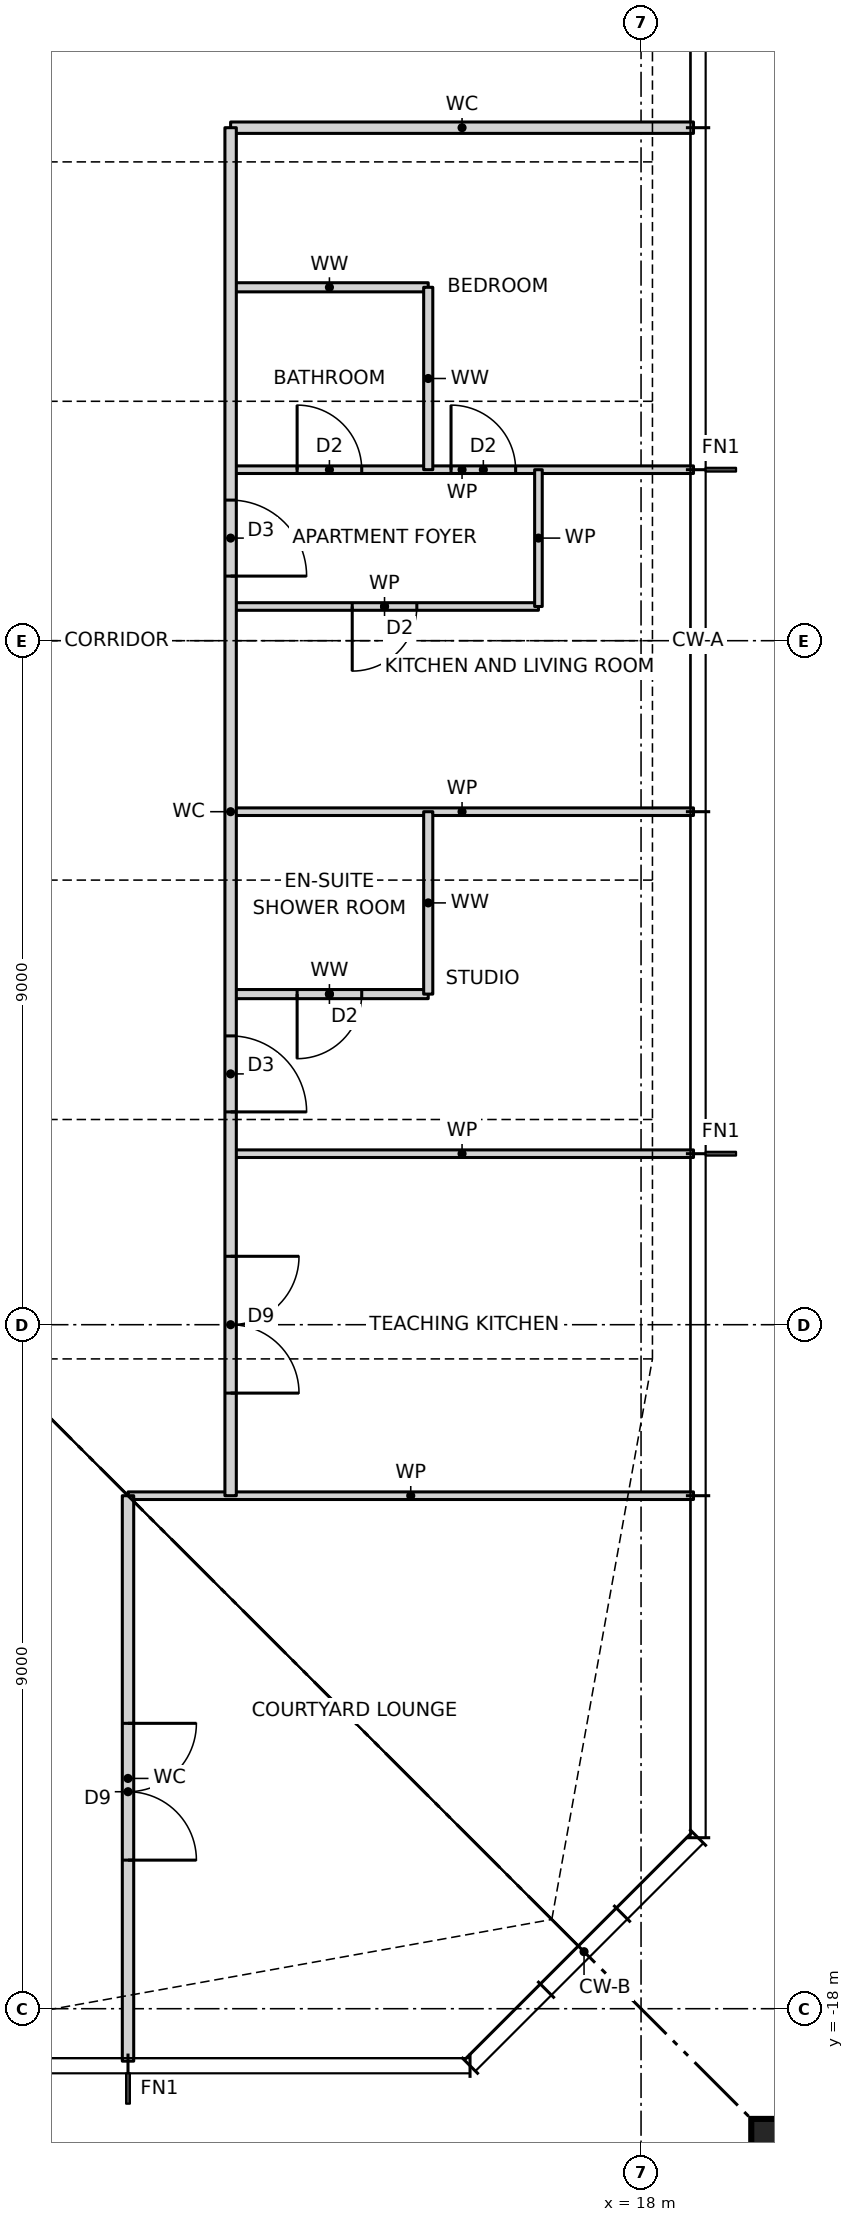
"""IFC4 building model, lengths in metres.
Left out: names, types, materials, properties, quantities, classifications, styles, units other than length and angle.
Written with IfcOpenShell. Run it as: python <this file> out.ifc"""

import sys

from ifc_helpers import new_model, si_unit, direction, frame, frame_2d, origin, origin_2d, place, context, subcontext, project, spatial, rectangle, i_section, extrude, element, fill, save


model = new_model("IFC4")
c1 = context("Model", 3, precision=1e-05, world=origin(), true_north=direction((0.0, 1.0)))
c2 = subcontext(c1, "Body", "Model", "MODEL_VIEW")
j1 = project(units=[si_unit("LENGTHUNIT", "METRE"), si_unit("PLANEANGLEUNIT", "RADIAN")], contexts=[c1])
p1 = place(None, origin())
s1 = spatial("IfcSite", under=j1, at=p1, CompositionType="ELEMENT")
p2 = place(p1, origin())
s2 = spatial("IfcBuilding", under=s1, at=p2, CompositionType="ELEMENT")
p3 = place(p2, frame((0.0, 0.0, 205.5)))
s3 = spatial("IfcBuildingStorey", under=s2, at=p3, CompositionType="ELEMENT", Elevation=205.5)
p4 = place(p3, frame((21.65, -21.65, 0.0), z_axis=(0.0, 0.0, 1.0), x_axis=(1.0, 0.0, 0.0)))
e1 = element("IfcColumn", 1, at=p4, inside=s3, PredefinedType="COLUMN", context=c2, shape_type="SweptSolid", body=[
    extrude(rectangle(XDim=4.4, YDim=4.4, at=origin_2d()), origin(), (0.0, 0.0, 1.0), 3.5),
    extrude(i_section(OverallWidth=0.478, OverallDepth=0.599, WebThickness=0.1, FlangeThickness=0.14, at=origin_2d()), origin(), (0.0, 0.0, 1.0), 3.5),
])
p5 = place(p3, frame((11.25, -11.25, 0.0), z_axis=(0.0, 0.0, 1.0), x_axis=(1.0, 0.0, 0.0)))
e2 = element("IfcWall", 2, at=p5, inside=s3, PredefinedType="PARTITIONING", context=c2, shape_type="SweptSolid", body=[
    extrude(rectangle(XDim=7.44, YDim=0.1, at=frame_2d((3.72, 0.0))), origin(), (0.0, 0.0, 1.0), 3.2),
])
p6 = place(p3, frame((12.6, -6.75, 0.0), z_axis=(0.0, 0.0, 1.0), x_axis=(1.0, 0.0, 0.0)))
e3 = element("IfcWall", 3, at=p6, inside=s3, PredefinedType="PARTITIONING", context=c2, shape_type="SweptSolid", body=[
    extrude(rectangle(XDim=6.09, YDim=0.1, at=frame_2d((3.045, 0.0))), origin(), (0.0, 0.0, 1.0), 3.2),
])
p7 = place(p3, frame((12.6, -4.65, 0.0), z_axis=(0.0, 0.0, 1.0), x_axis=(1.0, 0.0, 0.0)))
e4 = element("IfcWall", 4, at=p7, inside=s3, PredefinedType="PARTITIONING", context=c2, shape_type="SweptSolid", body=[
    extrude(rectangle(XDim=2.6, YDim=0.12, at=frame_2d((1.3, 0.0))), origin(), (0.0, 0.0, 1.0), 3.2),
])
p8 = place(p7, frame((0.875, 0.0, 0.0)))
e5 = element("IfcOpeningElement", 5, at=p8, cuts=e4, PredefinedType="OPENING", context=c2, shape_type="SweptSolid", body=[
    extrude(rectangle(XDim=0.85, YDim=2.1, at=frame_2d((0.425, 1.05))), frame((0.0, 0.07, 0.0), z_axis=(0.0, -1.0, 0.0), x_axis=(1.0, 0.0, 0.0)), (0.0, 0.0, 1.0), 0.14),
])
p9 = place(p3, frame((12.6, -2.25, 0.0), z_axis=(0.0, 0.0, 1.0), x_axis=(1.0, 0.0, 0.0)))
e6 = element("IfcWall", 6, at=p9, inside=s3, PredefinedType="PARTITIONING", context=c2, shape_type="SweptSolid", body=[
    extrude(rectangle(XDim=6.09, YDim=0.1, at=frame_2d((3.045, 0.0))), origin(), (0.0, 0.0, 1.0), 3.2),
])
p10 = place(p3, frame((12.6, 0.45, 0.0), z_axis=(0.0, 0.0, 1.0), x_axis=(1.0, 0.0, 0.0)))
e7 = element("IfcWall", 7, at=p10, inside=s3, PredefinedType="PARTITIONING", context=c2, shape_type="SweptSolid", body=[
    extrude(rectangle(XDim=4.05, YDim=0.1, at=frame_2d((2.025, 0.0))), origin(), (0.0, 0.0, 1.0), 3.2),
])
p11 = place(p10, frame((1.6, 0.0, 0.0)))
e8 = element("IfcOpeningElement", 8, at=p11, cuts=e7, PredefinedType="OPENING", context=c2, shape_type="SweptSolid", body=[
    extrude(rectangle(XDim=0.85, YDim=2.1, at=frame_2d((0.425, 1.05))), frame((0.0, 0.06, 0.0), z_axis=(0.0, -1.0, 0.0), x_axis=(1.0, 0.0, 0.0)), (0.0, 0.0, 1.0), 0.12),
])
p12 = place(p3, frame((12.6, 2.25, 0.0), z_axis=(0.0, 0.0, 1.0), x_axis=(1.0, 0.0, 0.0)))
e9 = element("IfcWall", 9, at=p12, inside=s3, PredefinedType="PARTITIONING", context=c2, shape_type="SweptSolid", body=[
    extrude(rectangle(XDim=6.09, YDim=0.1, at=frame_2d((3.045, 0.0))), origin(), (0.0, 0.0, 1.0), 3.2),
])
p13 = place(p12, frame((2.9, 0.0, 0.0)))
e10 = element("IfcOpeningElement", 10, at=p13, cuts=e9, PredefinedType="OPENING", context=c2, shape_type="SweptSolid", body=[
    extrude(rectangle(XDim=0.85, YDim=2.1, at=frame_2d((0.425, 1.05))), frame((0.0, 0.06, 0.0), z_axis=(0.0, -1.0, 0.0), x_axis=(1.0, 0.0, 0.0)), (0.0, 0.0, 1.0), 0.12),
])
p14 = place(p12, frame((0.875, 0.0, 0.0)))
e11 = element("IfcOpeningElement", 11, at=p14, cuts=e9, PredefinedType="OPENING", context=c2, shape_type="SweptSolid", body=[
    extrude(rectangle(XDim=0.85, YDim=2.1, at=frame_2d((0.425, 1.05))), frame((0.0, 0.06, 0.0), z_axis=(0.0, -1.0, 0.0), x_axis=(1.0, 0.0, 0.0)), (0.0, 0.0, 1.0), 0.12),
])
p15 = place(p3, frame((12.6, 4.65, 0.0), z_axis=(0.0, 0.0, 1.0), x_axis=(1.0, 0.0, 0.0)))
e12 = element("IfcWall", 12, at=p15, inside=s3, PredefinedType="PARTITIONING", context=c2, shape_type="SweptSolid", body=[
    extrude(rectangle(XDim=2.6, YDim=0.12, at=frame_2d((1.3, 0.0))), origin(), (0.0, 0.0, 1.0), 3.2),
])
p16 = place(p3, frame((12.6, 6.75, 0.0), z_axis=(0.0, 0.0, 1.0), x_axis=(1.0, 0.0, 0.0)))
e13 = element("IfcWall", 13, at=p16, inside=s3, PredefinedType="PARTITIONING", context=c2, shape_type="SweptSolid", body=[
    extrude(rectangle(XDim=6.09, YDim=0.15, at=frame_2d((3.045, 0.0))), origin(), (0.0, 0.0, 1.0), 3.2),
])
p17 = place(p3, frame((16.65, 0.45, 0.0), z_axis=(0.0, 0.0, 1.0), x_axis=(0.0, 1.0, 0.0)))
e14 = element("IfcWall", 14, at=p17, inside=s3, PredefinedType="PARTITIONING", context=c2, shape_type="SweptSolid", body=[
    extrude(rectangle(XDim=1.8, YDim=0.1, at=frame_2d((0.9, 0.0))), origin(), (0.0, 0.0, 1.0), 3.2),
])
for number, where, z_axis, x_axis in (
    (15, (15.2, -4.65, 0.0), (0.0, 0.0, 1.0), (0.0, 1.0, 0.0)),
    (16, (15.2, 2.25, 0.0), (0.0, 0.0, 1.0), (0.0, 1.0, 0.0)),
):
    element("IfcWall", number, at=place(p3, frame(where, z_axis=z_axis, x_axis=x_axis)), inside=s3, PredefinedType="PARTITIONING", context=c2, shape_type="SweptSolid", body=[
        extrude(rectangle(XDim=2.4, YDim=0.12, at=frame_2d((1.2, 0.0))), origin(), (0.0, 0.0, 1.0), 3.2),
    ])
p18 = place(p3, frame((12.6, -11.25, 0.0), z_axis=(0.0, 0.0, 1.0), x_axis=(0.0, 1.0, 0.0)))
e17 = element("IfcWall", 17, at=p18, inside=s3, PredefinedType="PARTITIONING", context=c2, shape_type="SweptSolid", body=[
    extrude(rectangle(XDim=18.0, YDim=0.15, at=frame_2d((9.0, 0.0))), origin(), (0.0, 0.0, 1.0), 3.2),
])
p19 = place(p18, frame((1.35, 0.0, 0.0)))
e18 = element("IfcOpeningElement", 18, at=p19, cuts=e17, PredefinedType="OPENING", context=c2, shape_type="SweptSolid", body=[
    extrude(rectangle(XDim=1.8, YDim=2.1, at=frame_2d((0.9, 1.05))), frame((0.0, 0.085, 0.0), z_axis=(0.0, -1.0, 0.0), x_axis=(1.0, 0.0, 0.0)), (0.0, 0.0, 1.0), 0.17),
])
p20 = place(p18, frame((5.05, 0.0, 0.0)))
e19 = element("IfcOpeningElement", 19, at=p20, cuts=e17, PredefinedType="OPENING", context=c2, shape_type="SweptSolid", body=[
    extrude(rectangle(XDim=1.0, YDim=2.1, at=frame_2d((0.5, 1.05))), frame((0.0, 0.085, 0.0), z_axis=(0.0, -1.0, 0.0), x_axis=(1.0, 0.0, 0.0)), (0.0, 0.0, 1.0), 0.17),
])
p21 = place(p18, frame((12.1, 0.0, 0.0)))
e20 = element("IfcOpeningElement", 20, at=p21, cuts=e17, PredefinedType="OPENING", context=c2, shape_type="SweptSolid", body=[
    extrude(rectangle(XDim=1.0, YDim=2.1, at=frame_2d((0.5, 1.05))), frame((0.0, 0.085, 0.0), z_axis=(0.0, -1.0, 0.0), x_axis=(1.0, 0.0, 0.0)), (0.0, 0.0, 1.0), 0.17),
])
p22 = place(p3, frame((11.25, -18.69, 0.0), z_axis=(0.0, 0.0, 1.0), x_axis=(0.0, 1.0, 0.0)))
e21 = element("IfcWall", 21, at=p22, inside=s3, PredefinedType="PARTITIONING", context=c2, shape_type="SweptSolid", body=[
    extrude(rectangle(XDim=7.44, YDim=0.15, at=frame_2d((3.72, 0.0))), origin(), (0.0, 0.0, 1.0), 3.2),
])
p23 = place(p22, frame((2.645, 0.0, 0.0)))
e22 = element("IfcOpeningElement", 22, at=p23, cuts=e21, PredefinedType="OPENING", context=c2, shape_type="SweptSolid", body=[
    extrude(rectangle(XDim=1.8, YDim=2.1, at=frame_2d((0.9, 1.05))), frame((0.0, 0.085, 0.0), z_axis=(0.0, -1.0, 0.0), x_axis=(1.0, 0.0, 0.0)), (0.0, 0.0, 1.0), 0.17),
])
p24 = place(p19, frame((1.8, 0.0, 0.0), z_axis=(0.0, 0.0, 1.0), x_axis=(-1.0, 0.0, 0.0)))
e23 = element("IfcDoor", 23, at=p24, inside=s3, OperationType="DOUBLE_DOOR_SINGLE_SWING", PredefinedType="DOOR", context=c2, shape_type="SweptSolid", body=[
    extrude(rectangle(XDim=1.8, YDim=2.1, at=frame_2d((0.9, 1.05))), frame((0.0, 0.025, 0.0), z_axis=(0.0, -1.0, 0.0), x_axis=(1.0, 0.0, 0.0)), (0.0, 0.0, 1.0), 0.05),
])
fill(e18, e23)
p25 = place(p20, frame((1.0, 0.0, 0.0), z_axis=(0.0, 0.0, 1.0), x_axis=(-1.0, 0.0, 0.0)))
e24 = element("IfcDoor", 24, at=p25, inside=s3, OperationType="SINGLE_SWING_RIGHT", PredefinedType="DOOR", context=c2, shape_type="SweptSolid", body=[
    extrude(rectangle(XDim=1.0, YDim=2.1, at=frame_2d((0.5, 1.05))), frame((0.0, 0.025, 0.0), z_axis=(0.0, -1.0, 0.0), x_axis=(1.0, 0.0, 0.0)), (0.0, 0.0, 1.0), 0.05),
])
fill(e19, e24)
p26 = place(p8, frame((0.85, 0.0, 0.0), z_axis=(0.0, 0.0, 1.0), x_axis=(-1.0, 0.0, 0.0)))
e25 = element("IfcDoor", 25, at=p26, inside=s3, OperationType="SINGLE_SWING_RIGHT", PredefinedType="DOOR", context=c2, shape_type="SweptSolid", body=[
    extrude(rectangle(XDim=0.85, YDim=2.1, at=frame_2d((0.425, 1.05))), frame((0.0, 0.025, 0.0), z_axis=(0.0, -1.0, 0.0), x_axis=(1.0, 0.0, 0.0)), (0.0, 0.0, 1.0), 0.05),
])
fill(e5, e25)
p27 = place(p21, frame((1.0, 0.0, 0.0), z_axis=(0.0, 0.0, 1.0), x_axis=(-1.0, 0.0, 0.0)))
e26 = element("IfcDoor", 26, at=p27, inside=s3, OperationType="SINGLE_SWING_RIGHT", PredefinedType="DOOR", context=c2, shape_type="SweptSolid", body=[
    extrude(rectangle(XDim=1.0, YDim=2.1, at=frame_2d((0.5, 1.05))), frame((0.0, 0.025, 0.0), z_axis=(0.0, -1.0, 0.0), x_axis=(1.0, 0.0, 0.0)), (0.0, 0.0, 1.0), 0.05),
])
fill(e20, e26)
p28 = place(p11, frame((0.85, 0.0, 0.0), z_axis=(0.0, 0.0, 1.0), x_axis=(-1.0, 0.0, 0.0)))
e27 = element("IfcDoor", 27, at=p28, inside=s3, OperationType="SINGLE_SWING_RIGHT", PredefinedType="DOOR", context=c2, shape_type="SweptSolid", body=[
    extrude(rectangle(XDim=0.85, YDim=2.1, at=frame_2d((0.425, 1.05))), frame((0.0, 0.025, 0.0), z_axis=(0.0, -1.0, 0.0), x_axis=(1.0, 0.0, 0.0)), (0.0, 0.0, 1.0), 0.05),
])
fill(e8, e27)
p29 = place(p13, origin())
e28 = element("IfcDoor", 28, at=p29, inside=s3, OperationType="SINGLE_SWING_LEFT", PredefinedType="DOOR", context=c2, shape_type="SweptSolid", body=[
    extrude(rectangle(XDim=0.85, YDim=2.1, at=frame_2d((0.425, 1.05))), frame((0.0, 0.025, 0.0), z_axis=(0.0, -1.0, 0.0), x_axis=(1.0, 0.0, 0.0)), (0.0, 0.0, 1.0), 0.05),
])
fill(e10, e28)
p30 = place(p14, origin())
e29 = element("IfcDoor", 29, at=p30, inside=s3, OperationType="SINGLE_SWING_LEFT", PredefinedType="DOOR", context=c2, shape_type="SweptSolid", body=[
    extrude(rectangle(XDim=0.85, YDim=2.1, at=frame_2d((0.425, 1.05))), frame((0.0, 0.025, 0.0), z_axis=(0.0, -1.0, 0.0), x_axis=(1.0, 0.0, 0.0)), (0.0, 0.0, 1.0), 0.05),
])
fill(e11, e29)
p31 = place(p23, frame((1.8, 0.0, 0.0), z_axis=(0.0, 0.0, 1.0), x_axis=(-1.0, 0.0, 0.0)))
e30 = element("IfcDoor", 30, at=p31, inside=s3, OperationType="DOUBLE_DOOR_SINGLE_SWING", PredefinedType="DOOR", context=c2, shape_type="SweptSolid", body=[
    extrude(rectangle(XDim=1.8, YDim=2.1, at=frame_2d((0.9, 1.05))), frame((0.0, 0.025, 0.0), z_axis=(0.0, -1.0, 0.0), x_axis=(1.0, 0.0, 0.0)), (0.0, 0.0, 1.0), 0.05),
])
fill(e22, e30)
save(model, sys.argv[1])
